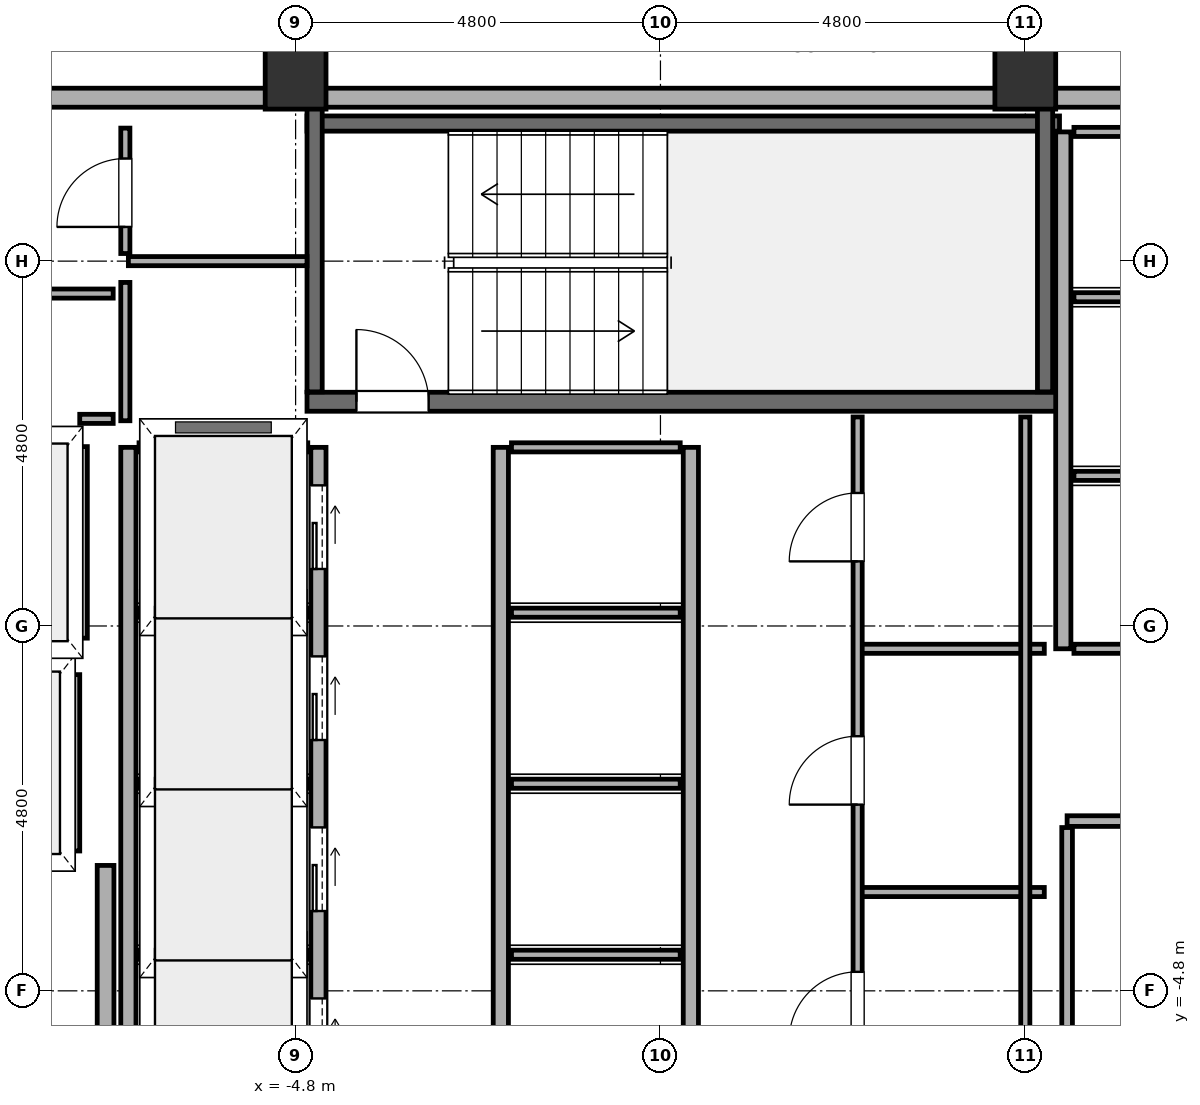
"""IFC4 building model, lengths in metres.
Left out: names, types, materials, properties, quantities, classifications, styles, units other than length and angle.
Written with IfcOpenShell. Run it as: python <this file> out.ifc"""

import sys

from ifc_helpers import new_model, si_unit, direction, frame, frame_2d, origin, origin_2d, place, context, subcontext, project, spatial, rectangle, hollow_rectangle, extrude, element, fill, save


model = new_model("IFC4")
c1 = context("Model", 3, precision=1e-05, world=origin(), true_north=direction((0.0, 1.0)))
c2 = subcontext(c1, "Body", "Model", "MODEL_VIEW")
j1 = project(units=[si_unit("LENGTHUNIT", "METRE"), si_unit("PLANEANGLEUNIT", "RADIAN")], contexts=[c1])
p1 = place(None, origin())
s1 = spatial("IfcSite", under=j1, at=p1, CompositionType="ELEMENT")
p2 = place(p1, origin())
s2 = spatial("IfcBuilding", under=s1, at=p2, CompositionType="ELEMENT")
p3 = place(p2, frame((0.0, 0.0, 85.5)))
s3 = spatial("IfcBuildingStorey", under=s2, at=p3, CompositionType="ELEMENT", Elevation=85.5)
for number, where, z_axis, x_axis in (
    (1, (-4.8, 7.2, 0.0), (0.0, 0.0, 1.0), (1.0, 0.0, 0.0)),
    (2, (4.8, 7.2, 0.0), (0.0, 0.0, 1.0), (1.0, 0.0, 0.0)),
):
    element("IfcColumn", number, at=place(p3, frame(where, z_axis=z_axis, x_axis=x_axis)), inside=s3, PredefinedType="COLUMN", context=c2, shape_type="SweptSolid", body=[
        extrude(hollow_rectangle(XDim=0.8, YDim=0.8, WallThickness=0.036, at=origin_2d()), origin(), (0.0, 0.0, 1.0), 3.7),
    ])
p4 = place(p3, frame((-14.2, 6.95, 0.0), z_axis=(0.0, 0.0, 1.0), x_axis=(1.0, 0.0, 0.0)))
e3 = element("IfcWall", 3, at=p4, inside=s3, PredefinedType="SOLIDWALL", context=c2, shape_type="SweptSolid", body=[
    extrude(rectangle(XDim=9.4, YDim=0.25, at=frame_2d((4.7, 0.0))), origin(), (0.0, 0.0, 1.0), 2.05),
])
p5 = place(p4, frame((4.9, 0.0, 0.0)))
e4 = element("IfcOpeningElement", 4, at=p5, cuts=e3, PredefinedType="OPENING", context=c2, shape_type="SweptSolid", body=[
    extrude(rectangle(XDim=1.0, YDim=2.02, at=frame_2d((0.5, 1.01))), frame((0.0, 0.14, 0.0), z_axis=(0.0, -1.0, 0.0), x_axis=(1.0, 0.0, 0.0)), (0.0, 0.0, 1.0), 0.28),
])
p6 = place(p3, frame((-4.6, 6.95, 0.0), z_axis=(0.0, 0.0, 1.0), x_axis=(1.0, 0.0, 0.0)))
e5 = element("IfcWall", 5, at=p6, inside=s3, PredefinedType="SOLIDWALL", context=c2, shape_type="SweptSolid", body=[
    extrude(rectangle(XDim=9.2, YDim=0.25, at=frame_2d((4.6, 0.0))), origin(), (0.0, 0.0, 1.0), 2.05),
])
p7 = place(p3, frame((4.8, 6.95, 0.0), z_axis=(0.0, 0.0, 1.0), x_axis=(1.0, 0.0, 0.0)))
e6 = element("IfcWall", 6, at=p7, inside=s3, PredefinedType="SOLIDWALL", context=c2, shape_type="SweptSolid", body=[
    extrude(rectangle(XDim=9.4, YDim=0.25, at=frame_2d((4.7, 0.0))), origin(), (0.0, 0.0, 1.0), 2.05),
])
p8 = place(p7, frame((3.5, 0.0, 0.0)))
e7 = element("IfcOpeningElement", 7, at=p8, cuts=e6, PredefinedType="OPENING", context=c2, shape_type="SweptSolid", body=[
    extrude(rectangle(XDim=1.2, YDim=2.02, at=frame_2d((0.6, 1.01))), frame((0.0, 0.14, 0.0), z_axis=(0.0, -1.0, 0.0), x_axis=(1.0, 0.0, 0.0)), (0.0, 0.0, 1.0), 0.28),
])
p9 = place(p3, frame((-7.3, -6.82, 0.0), z_axis=(0.0, 0.0, 1.0), x_axis=(0.0, 1.0, 0.0)))
e8 = element("IfcWall", 8, at=p9, inside=s3, PredefinedType="SOLIDWALL", context=c2, shape_type="SweptSolid", body=[
    extrude(rectangle(XDim=3.67, YDim=0.22, at=frame_2d((1.835, 0.0))), origin(), (0.0, 0.0, 1.0), 2.05),
])
p10 = place(p3, frame((-4.65, 2.95, -0.18), z_axis=(0.0, 0.0, 1.0), x_axis=(1.0, 0.0, 0.0)))
e9 = element("IfcWall", 9, at=p10, inside=s3, PredefinedType="SOLIDWALL", context=c2, shape_type="SweptSolid", body=[
    extrude(rectangle(XDim=9.9, YDim=0.25, at=frame_2d((4.95, 0.0))), origin(), (0.0, 0.0, 1.0), 3.63),
])
p11 = place(p10, frame((0.65, 0.0, 0.18)))
e10 = element("IfcOpeningElement", 10, at=p11, cuts=e9, PredefinedType="OPENING", context=c2, shape_type="SweptSolid", body=[
    extrude(rectangle(XDim=0.95, YDim=2.15, at=frame_2d((0.475, 1.075))), frame((0.0, 0.14, 0.0), z_axis=(0.0, -1.0, 0.0), x_axis=(1.0, 0.0, 0.0)), (0.0, 0.0, 1.0), 0.28),
])
p12 = place(p3, frame((-4.65, 6.61, -0.18), z_axis=(0.0, 0.0, 1.0), x_axis=(1.0, 0.0, 0.0)))
e11 = element("IfcWall", 11, at=p12, inside=s3, PredefinedType="SOLIDWALL", context=c2, shape_type="SweptSolid", body=[
    extrude(rectangle(XDim=9.9, YDim=0.2, at=frame_2d((4.95, 0.0))), origin(), (0.0, 0.0, 1.0), 3.63),
])
for number, where, z_axis, x_axis in (
    (12, (-4.55, 3.08, -0.18), (0.0, 0.0, 1.0), (0.0, 1.0, 0.0)),
    (13, (5.06, 3.08, -0.18), (0.0, 0.0, 1.0), (0.0, 1.0, 0.0)),
):
    element("IfcWall", number, at=place(p3, frame(where, z_axis=z_axis, x_axis=x_axis)), inside=s3, PredefinedType="SOLIDWALL", context=c2, shape_type="SweptSolid", body=[
        extrude(rectangle(XDim=3.74, YDim=0.2, at=frame_2d((1.87, 0.0))), origin(), (0.0, 0.0, 1.0), 3.63),
    ])
p13 = place(p3, frame((-4.5, -6.5, 0.0), z_axis=(0.0, 0.0, 1.0), x_axis=(0.0, 1.0, 0.0)))
e14 = element("IfcWall", 14, at=p13, inside=s3, PredefinedType="SOLIDWALL", context=c2, shape_type="SweptSolid", body=[
    extrude(rectangle(XDim=8.85, YDim=0.2, at=frame_2d((4.425, 0.0))), origin(), (0.0, 0.0, 1.0), 3.45),
])
p14 = place(p13, frame((0.5, 0.0, 0.0)))
e15 = element("IfcOpeningElement", 15, at=p14, cuts=e14, PredefinedType="OPENING", context=c2, shape_type="SweptSolid", body=[
    extrude(rectangle(XDim=1.1, YDim=2.2, at=frame_2d((0.55, 1.1))), frame((0.0, 0.115, 0.0), z_axis=(0.0, -1.0, 0.0), x_axis=(1.0, 0.0, 0.0)), (0.0, 0.0, 1.0), 0.23),
])
p15 = place(p13, frame((2.75, 0.0, 0.0)))
e16 = element("IfcOpeningElement", 16, at=p15, cuts=e14, PredefinedType="OPENING", context=c2, shape_type="SweptSolid", body=[
    extrude(rectangle(XDim=1.1, YDim=2.2, at=frame_2d((0.55, 1.1))), frame((0.0, 0.115, 0.0), z_axis=(0.0, -1.0, 0.0), x_axis=(1.0, 0.0, 0.0)), (0.0, 0.0, 1.0), 0.23),
])
p16 = place(p13, frame((5.0, 0.0, 0.0)))
e17 = element("IfcOpeningElement", 17, at=p16, cuts=e14, PredefinedType="OPENING", context=c2, shape_type="SweptSolid", body=[
    extrude(rectangle(XDim=1.1, YDim=2.2, at=frame_2d((0.55, 1.1))), frame((0.0, 0.115, 0.0), z_axis=(0.0, -1.0, 0.0), x_axis=(1.0, 0.0, 0.0)), (0.0, 0.0, 1.0), 0.23),
])
p17 = place(p13, frame((7.25, 0.0, 0.0)))
e18 = element("IfcOpeningElement", 18, at=p17, cuts=e14, PredefinedType="OPENING", context=c2, shape_type="SweptSolid", body=[
    extrude(rectangle(XDim=1.1, YDim=2.2, at=frame_2d((0.55, 1.1))), frame((0.0, 0.115, 0.0), z_axis=(0.0, -1.0, 0.0), x_axis=(1.0, 0.0, 0.0)), (0.0, 0.0, 1.0), 0.23),
])
p18 = place(p3, frame((-7.0, -6.5, 0.0), z_axis=(0.0, 0.0, 1.0), x_axis=(0.0, 1.0, 0.0)))
e19 = element("IfcWall", 19, at=p18, inside=s3, PredefinedType="SOLIDWALL", context=c2, shape_type="SweptSolid", body=[
    extrude(rectangle(XDim=8.85, YDim=0.2, at=frame_2d((4.425, 0.0))), origin(), (0.0, 0.0, 1.0), 3.45),
])
for number, where, z_axis, x_axis in (
    (20, (-6.86, -4.325, 0.0), (0.0, 0.0, 1.0), (1.0, 0.0, 0.0)),
    (21, (-6.86, -2.075, 0.0), (0.0, 0.0, 1.0), (1.0, 0.0, 0.0)),
    (22, (-6.86, 0.175, 0.0), (0.0, 0.0, 1.0), (1.0, 0.0, 0.0)),
    (23, (-6.86, 2.35, 0.0), (0.0, 0.0, 1.0), (1.0, 0.0, 0.0)),
):
    element("IfcWall", number, at=place(p3, frame(where, z_axis=z_axis, x_axis=x_axis)), inside=s3, PredefinedType="PARTITIONING", context=c2, shape_type="SweptSolid", body=[
        extrude(rectangle(XDim=2.22, YDim=0.12, at=frame_2d((1.11, 0.0))), origin(), (0.0, 0.0, 1.0), 3.45),
    ])
for number, where, z_axis, x_axis in (
    (24, (-2.1, -6.5, 0.0), (0.0, 0.0, 1.0), (0.0, 1.0, 0.0)),
    (25, (0.4, -6.5, 0.0), (0.0, 0.0, 1.0), (0.0, 1.0, 0.0)),
):
    element("IfcWall", number, at=place(p3, frame(where, z_axis=z_axis, x_axis=x_axis)), inside=s3, PredefinedType="SOLIDWALL", context=c2, shape_type="SweptSolid", body=[
        extrude(rectangle(XDim=8.85, YDim=0.2, at=frame_2d((4.425, 0.0))), origin(), (0.0, 0.0, 1.0), 3.45),
    ])
for number, where, z_axis, x_axis in (
    (26, (-1.96, -4.325, 0.0), (0.0, 0.0, 1.0), (1.0, 0.0, 0.0)),
    (27, (-1.96, -2.075, 0.0), (0.0, 0.0, 1.0), (1.0, 0.0, 0.0)),
    (28, (-1.96, 0.175, 0.0), (0.0, 0.0, 1.0), (1.0, 0.0, 0.0)),
    (29, (-1.96, 2.35, 0.0), (0.0, 0.0, 1.0), (1.0, 0.0, 0.0)),
):
    element("IfcWall", number, at=place(p3, frame(where, z_axis=z_axis, x_axis=x_axis)), inside=s3, PredefinedType="PARTITIONING", context=c2, shape_type="SweptSolid", body=[
        extrude(rectangle(XDim=2.22, YDim=0.12, at=frame_2d((1.11, 0.0))), origin(), (0.0, 0.0, 1.0), 3.45),
    ])
p19 = place(p3, frame((5.3, -0.3, 0.0), z_axis=(0.0, 0.0, 1.0), x_axis=(0.0, 1.0, 0.0)))
e30 = element("IfcWall", 30, at=p19, inside=s3, PredefinedType="SOLIDWALL", context=c2, shape_type="SweptSolid", body=[
    extrude(rectangle(XDim=6.8, YDim=0.2, at=frame_2d((3.4, 0.0))), origin(), (0.0, 0.0, 1.0), 3.45),
])
for number, where, z_axis, x_axis in (
    (31, (5.44, -0.3, 0.0), (0.0, 0.0, 1.0), (1.0, 0.0, 0.0)),
    (32, (5.44, 1.975, 0.0), (0.0, 0.0, 1.0), (1.0, 0.0, 0.0)),
    (33, (5.44, 4.325, 0.0), (0.0, 0.0, 1.0), (1.0, 0.0, 0.0)),
    (34, (5.44, 6.5, 0.0), (0.0, 0.0, 1.0), (1.0, 0.0, 0.0)),
):
    element("IfcWall", number, at=place(p3, frame(where, z_axis=z_axis, x_axis=x_axis)), inside=s3, PredefinedType="PARTITIONING", context=c2, shape_type="SweptSolid", body=[
        extrude(rectangle(XDim=2.12, YDim=0.12, at=frame_2d((1.06, 0.0))), origin(), (0.0, 0.0, 1.0), 3.45),
    ])
p20 = place(p3, frame((-9.82, -3.1, 0.0), z_axis=(0.0, 0.0, 1.0), x_axis=(1.0, 0.0, 0.0)))
e35 = element("IfcWall", 35, at=p20, inside=s3, PredefinedType="SOLIDWALL", context=c2, shape_type="SweptSolid", body=[
    extrude(rectangle(XDim=2.04, YDim=0.2, at=frame_2d((1.02, 0.0))), origin(), (0.0, 0.0, 1.0), 3.45),
])
p21 = place(p20, frame((0.47, 0.0, 0.0)))
e36 = element("IfcOpeningElement", 36, at=p21, cuts=e35, PredefinedType="OPENING", context=c2, shape_type="SweptSolid", body=[
    extrude(rectangle(XDim=1.1, YDim=2.2, at=frame_2d((0.55, 1.1))), frame((0.0, 0.115, 0.0), z_axis=(0.0, -1.0, 0.0), x_axis=(1.0, 0.0, 0.0)), (0.0, 0.0, 1.0), 0.23),
])
p22 = place(p3, frame((-9.82, -0.5, 0.0), z_axis=(0.0, 0.0, 1.0), x_axis=(1.0, 0.0, 0.0)))
e37 = element("IfcWall", 37, at=p22, inside=s3, PredefinedType="SOLIDWALL", context=c2, shape_type="SweptSolid", body=[
    extrude(rectangle(XDim=2.04, YDim=0.2, at=frame_2d((1.02, 0.0))), origin(), (0.0, 0.0, 1.0), 3.45),
])
p23 = place(p3, frame((-7.7, -2.96, 0.0), z_axis=(0.0, 0.0, 1.0), x_axis=(0.0, 1.0, 0.0)))
e38 = element("IfcWall", 38, at=p23, inside=s3, PredefinedType="PARTITIONING", context=c2, shape_type="SweptSolid", body=[
    extrude(rectangle(XDim=2.32, YDim=0.12, at=frame_2d((1.16, 0.0))), origin(), (0.0, 0.0, 1.0), 3.45),
])
p24 = place(p3, frame((-9.92, 2.5, 0.0), z_axis=(0.0, 0.0, 1.0), x_axis=(1.0, 0.0, 0.0)))
e39 = element("IfcWall", 39, at=p24, inside=s3, PredefinedType="SOLIDWALL", context=c2, shape_type="SweptSolid", body=[
    extrude(rectangle(XDim=2.24, YDim=0.2, at=frame_2d((1.12, 0.0))), origin(), (0.0, 0.0, 1.0), 3.45),
])
p25 = place(p24, frame((0.495, 0.0, 0.0)))
e40 = element("IfcOpeningElement", 40, at=p25, cuts=e39, PredefinedType="OPENING", context=c2, shape_type="SweptSolid", body=[
    extrude(rectangle(XDim=1.25, YDim=2.25, at=frame_2d((0.625, 1.125))), frame((0.0, 0.115, 0.0), z_axis=(0.0, -1.0, 0.0), x_axis=(1.0, 0.0, 0.0)), (0.0, 0.0, 1.0), 0.23),
])
p26 = place(p3, frame((-9.92, -0.3, 0.0), z_axis=(0.0, 0.0, 1.0), x_axis=(1.0, 0.0, 0.0)))
e41 = element("IfcWall", 41, at=p26, inside=s3, PredefinedType="SOLIDWALL", context=c2, shape_type="SweptSolid", body=[
    extrude(rectangle(XDim=2.24, YDim=0.2, at=frame_2d((1.12, 0.0))), origin(), (0.0, 0.0, 1.0), 3.45),
])
p27 = place(p3, frame((-7.6, -0.16, 0.0), z_axis=(0.0, 0.0, 1.0), x_axis=(0.0, 1.0, 0.0)))
e42 = element("IfcWall", 42, at=p27, inside=s3, PredefinedType="PARTITIONING", context=c2, shape_type="SweptSolid", body=[
    extrude(rectangle(XDim=2.52, YDim=0.12, at=frame_2d((1.26, 0.0))), origin(), (0.0, 0.0, 1.0), 3.45),
])
p28 = place(p3, frame((2.6, -3.5, 0.0), z_axis=(0.0, 0.0, 1.0), x_axis=(1.0, 0.0, 0.0)))
e43 = element("IfcWall", 43, at=p28, inside=s3, PredefinedType="PARTITIONING", context=c2, shape_type="SweptSolid", body=[
    extrude(rectangle(XDim=2.45, YDim=0.12, at=frame_2d((1.225, 0.0))), origin(), (0.0, 0.0, 1.0), 3.45),
])
p29 = place(p3, frame((5.35, -2.567, 0.0), z_axis=(0.0, 0.0, 1.0), x_axis=(1.0, 0.0, 0.0)))
e44 = element("IfcWall", 44, at=p29, inside=s3, PredefinedType="PLUMBINGWALL", context=c2, shape_type="SweptSolid", body=[
    extrude(rectangle(XDim=1.65, YDim=0.14, at=frame_2d((0.825, 0.0))), origin(), (0.0, 0.0, 1.0), 3.45),
])
p30 = place(p3, frame((2.6, -0.3, 0.0), z_axis=(0.0, 0.0, 1.0), x_axis=(1.0, 0.0, 0.0)))
e45 = element("IfcWall", 45, at=p30, inside=s3, PredefinedType="PARTITIONING", context=c2, shape_type="SweptSolid", body=[
    extrude(rectangle(XDim=2.45, YDim=0.12, at=frame_2d((1.225, 0.0))), origin(), (0.0, 0.0, 1.0), 3.45),
])
p31 = place(p3, frame((-7.64, 2.725, 0.0), z_axis=(0.0, 0.0, 1.0), x_axis=(1.0, 0.0, 0.0)))
e46 = element("IfcWall", 46, at=p31, inside=s3, PredefinedType="PARTITIONING", context=c2, shape_type="SweptSolid", body=[
    extrude(rectangle(XDim=0.44, YDim=0.12, at=frame_2d((0.22, 0.0))), origin(), (0.0, 0.0, 1.0), 3.45),
])
p32 = place(p3, frame((-10.4, 4.373, 0.0), z_axis=(0.0, 0.0, 1.0), x_axis=(1.0, 0.0, 0.0)))
e47 = element("IfcWall", 47, at=p32, inside=s3, PredefinedType="PARTITIONING", context=c2, shape_type="SweptSolid", body=[
    extrude(rectangle(XDim=3.2, YDim=0.12, at=frame_2d((1.6, 0.0))), origin(), (0.0, 0.0, 1.0), 3.45),
])
p33 = place(p32, frame((1.15, 0.0, 0.0)))
e48 = element("IfcOpeningElement", 48, at=p33, cuts=e47, PredefinedType="OPENING", context=c2, shape_type="SweptSolid", body=[
    extrude(rectangle(XDim=0.9, YDim=2.1, at=frame_2d((0.45, 1.05))), frame((0.0, 0.075, 0.0), z_axis=(0.0, -1.0, 0.0), x_axis=(1.0, 0.0, 0.0)), (0.0, 0.0, 1.0), 0.15),
])
p34 = place(p3, frame((-7.0, 4.8, 0.0), z_axis=(0.0, 0.0, 1.0), x_axis=(1.0, 0.0, 0.0)))
e49 = element("IfcWall", 49, at=p34, inside=s3, PredefinedType="PARTITIONING", context=c2, shape_type="SweptSolid", body=[
    extrude(rectangle(XDim=2.35, YDim=0.12, at=frame_2d((1.175, 0.0))), origin(), (0.0, 0.0, 1.0), 3.45),
])
p35 = place(p3, frame((-7.04, 2.7, 0.0), z_axis=(0.0, 0.0, 1.0), x_axis=(0.0, 1.0, 0.0)))
e50 = element("IfcWall", 50, at=p35, inside=s3, PredefinedType="PARTITIONING", context=c2, shape_type="SweptSolid", body=[
    extrude(rectangle(XDim=1.82, YDim=0.12, at=frame_2d((0.91, 0.0))), origin(), (0.0, 0.0, 1.0), 3.45),
])
p36 = place(p3, frame((-7.04, 4.9, 0.0), z_axis=(0.0, 0.0, 1.0), x_axis=(0.0, 1.0, 0.0)))
e51 = element("IfcWall", 51, at=p36, inside=s3, PredefinedType="PARTITIONING", context=c2, shape_type="SweptSolid", body=[
    extrude(rectangle(XDim=1.65, YDim=0.12, at=frame_2d((0.825, 0.0))), origin(), (0.0, 0.0, 1.0), 3.45),
])
p37 = place(p36, frame((0.35, 0.0, 0.0)))
e52 = element("IfcOpeningElement", 52, at=p37, cuts=e51, PredefinedType="OPENING", context=c2, shape_type="SweptSolid", body=[
    extrude(rectangle(XDim=0.9, YDim=2.1, at=frame_2d((0.45, 1.05))), frame((0.0, 0.075, 0.0), z_axis=(0.0, -1.0, 0.0), x_axis=(1.0, 0.0, 0.0)), (0.0, 0.0, 1.0), 0.15),
])
p38 = place(p3, frame((2.594, -6.415, 0.0), z_axis=(0.0, 0.0, 1.0), x_axis=(0.0, 1.0, 0.0)))
e53 = element("IfcWall", 53, at=p38, inside=s3, PredefinedType="PARTITIONING", context=c2, shape_type="SweptSolid", body=[
    extrude(rectangle(XDim=9.165, YDim=0.12, at=frame_2d((4.583, 0.0))), origin(), (0.0, 0.0, 1.0), 3.45),
])
p39 = place(p38, frame((0.965, 0.0, 0.0)))
e54 = element("IfcOpeningElement", 54, at=p39, cuts=e53, PredefinedType="OPENING", context=c2, shape_type="SweptSolid", body=[
    extrude(rectangle(XDim=0.9, YDim=2.1, at=frame_2d((0.45, 1.05))), frame((0.0, 0.075, 0.0), z_axis=(0.0, -1.0, 0.0), x_axis=(1.0, 0.0, 0.0)), (0.0, 0.0, 1.0), 0.15),
])
p40 = place(p38, frame((4.065, 0.0, 0.0)))
e55 = element("IfcOpeningElement", 55, at=p40, cuts=e53, PredefinedType="OPENING", context=c2, shape_type="SweptSolid", body=[
    extrude(rectangle(XDim=0.9, YDim=2.1, at=frame_2d((0.45, 1.05))), frame((0.0, 0.075, 0.0), z_axis=(0.0, -1.0, 0.0), x_axis=(1.0, 0.0, 0.0)), (0.0, 0.0, 1.0), 0.15),
])
p41 = place(p38, frame((7.265, 0.0, 0.0)))
e56 = element("IfcOpeningElement", 56, at=p41, cuts=e53, PredefinedType="OPENING", context=c2, shape_type="SweptSolid", body=[
    extrude(rectangle(XDim=0.9, YDim=2.1, at=frame_2d((0.45, 1.05))), frame((0.0, 0.075, 0.0), z_axis=(0.0, -1.0, 0.0), x_axis=(1.0, 0.0, 0.0)), (0.0, 0.0, 1.0), 0.15),
])
p42 = place(p3, frame((4.8, -6.415, 0.0), z_axis=(0.0, 0.0, 1.0), x_axis=(0.0, 1.0, 0.0)))
e57 = element("IfcWall", 57, at=p42, inside=s3, PredefinedType="PARTITIONING", context=c2, shape_type="SweptSolid", body=[
    extrude(rectangle(XDim=9.165, YDim=0.12, at=frame_2d((4.583, 0.0))), origin(), (0.0, 0.0, 1.0), 3.45),
])
p43 = place(p3, frame((5.35, -6.8, 0.0), z_axis=(0.0, 0.0, 1.0), x_axis=(0.0, 1.0, 0.0)))
e58 = element("IfcWall", 58, at=p43, inside=s3, PredefinedType="PLUMBINGWALL", context=c2, shape_type="SweptSolid", body=[
    extrude(rectangle(XDim=4.148, YDim=0.14, at=frame_2d((2.074, 0.0))), origin(), (0.0, 0.0, 1.0), 2.05),
])
p44 = place(p11, origin())
e59 = element("IfcDoor", 59, at=p44, inside=s3, OperationType="SINGLE_SWING_RIGHT", PredefinedType="DOOR", context=c2, shape_type="SweptSolid", body=[
    extrude(rectangle(XDim=0.95, YDim=2.15, at=frame_2d((0.475, 1.075))), frame((0.0, 0.025, 0.0), z_axis=(0.0, -1.0, 0.0), x_axis=(1.0, 0.0, 0.0)), (0.0, 0.0, 1.0), 0.05),
])
fill(e10, e59)
p45 = place(p14, origin())
e60 = element("IfcDoor", 60, at=p45, inside=s3, OperationType="SLIDING_TO_LEFT", PredefinedType="DOOR", context=c2, shape_type="SweptSolid", body=[
    extrude(rectangle(XDim=1.1, YDim=2.2, at=frame_2d((0.55, 1.1))), frame((0.0, 0.025, 0.0), z_axis=(0.0, -1.0, 0.0), x_axis=(1.0, 0.0, 0.0)), (0.0, 0.0, 1.0), 0.05),
])
fill(e15, e60)
p46 = place(p15, origin())
e61 = element("IfcDoor", 61, at=p46, inside=s3, OperationType="SLIDING_TO_LEFT", PredefinedType="DOOR", context=c2, shape_type="SweptSolid", body=[
    extrude(rectangle(XDim=1.1, YDim=2.2, at=frame_2d((0.55, 1.1))), frame((0.0, 0.025, 0.0), z_axis=(0.0, -1.0, 0.0), x_axis=(1.0, 0.0, 0.0)), (0.0, 0.0, 1.0), 0.05),
])
fill(e16, e61)
p47 = place(p16, origin())
e62 = element("IfcDoor", 62, at=p47, inside=s3, OperationType="SLIDING_TO_LEFT", PredefinedType="DOOR", context=c2, shape_type="SweptSolid", body=[
    extrude(rectangle(XDim=1.1, YDim=2.2, at=frame_2d((0.55, 1.1))), frame((0.0, 0.025, 0.0), z_axis=(0.0, -1.0, 0.0), x_axis=(1.0, 0.0, 0.0)), (0.0, 0.0, 1.0), 0.05),
])
fill(e17, e62)
p48 = place(p17, origin())
e63 = element("IfcDoor", 63, at=p48, inside=s3, OperationType="SLIDING_TO_LEFT", PredefinedType="DOOR", context=c2, shape_type="SweptSolid", body=[
    extrude(rectangle(XDim=1.1, YDim=2.2, at=frame_2d((0.55, 1.1))), frame((0.0, 0.025, 0.0), z_axis=(0.0, -1.0, 0.0), x_axis=(1.0, 0.0, 0.0)), (0.0, 0.0, 1.0), 0.05),
])
fill(e18, e63)
p49 = place(p37, origin())
e64 = element("IfcDoor", 64, at=p49, inside=s3, OperationType="SINGLE_SWING_RIGHT", PredefinedType="DOOR", context=c2, shape_type="SweptSolid", body=[
    extrude(rectangle(XDim=0.9, YDim=2.1, at=frame_2d((0.45, 1.05))), frame((0.0, 0.025, 0.0), z_axis=(0.0, -1.0, 0.0), x_axis=(1.0, 0.0, 0.0)), (0.0, 0.0, 1.0), 0.05),
])
fill(e52, e64)
p50 = place(p39, origin())
e65 = element("IfcDoor", 65, at=p50, inside=s3, OperationType="SINGLE_SWING_RIGHT", PredefinedType="DOOR", context=c2, shape_type="SweptSolid", body=[
    extrude(rectangle(XDim=0.9, YDim=2.1, at=frame_2d((0.45, 1.05))), frame((0.0, 0.025, 0.0), z_axis=(0.0, -1.0, 0.0), x_axis=(1.0, 0.0, 0.0)), (0.0, 0.0, 1.0), 0.05),
])
fill(e54, e65)
p51 = place(p40, origin())
e66 = element("IfcDoor", 66, at=p51, inside=s3, OperationType="SINGLE_SWING_LEFT", PredefinedType="DOOR", context=c2, shape_type="SweptSolid", body=[
    extrude(rectangle(XDim=0.9, YDim=2.1, at=frame_2d((0.45, 1.05))), frame((0.0, 0.025, 0.0), z_axis=(0.0, -1.0, 0.0), x_axis=(1.0, 0.0, 0.0)), (0.0, 0.0, 1.0), 0.05),
])
fill(e55, e66)
p52 = place(p41, origin())
e67 = element("IfcDoor", 67, at=p52, inside=s3, OperationType="SINGLE_SWING_LEFT", PredefinedType="DOOR", context=c2, shape_type="SweptSolid", body=[
    extrude(rectangle(XDim=0.9, YDim=2.1, at=frame_2d((0.45, 1.05))), frame((0.0, 0.025, 0.0), z_axis=(0.0, -1.0, 0.0), x_axis=(1.0, 0.0, 0.0)), (0.0, 0.0, 1.0), 0.05),
])
fill(e56, e67)
save(model, sys.argv[1])
